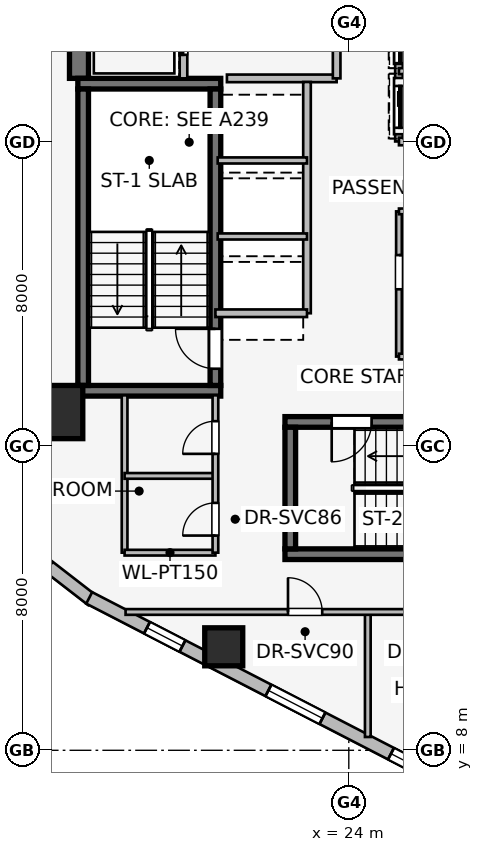
"""IFC4 building model, lengths in metres.
Left out: names, types, materials, properties, quantities, classifications, styles, units other than length and angle.
Written with IfcOpenShell. Run it as: python <this file> out.ifc"""

import sys

from ifc_helpers import new_model, si_unit, direction, frame, frame_2d, origin, origin_2d, place, context, subcontext, project, spatial, rectangle, extrude, element, fill, save


model = new_model("IFC4")
c1 = context("Model", 3, precision=1e-05, world=origin(), true_north=direction((0.0, 1.0)))
c2 = subcontext(c1, "Body", "Model", "MODEL_VIEW")
j1 = project(units=[si_unit("LENGTHUNIT", "METRE"), si_unit("PLANEANGLEUNIT", "RADIAN")], contexts=[c1])
p1 = place(None, origin())
s1 = spatial("IfcSite", under=j1, at=p1, CompositionType="ELEMENT")
p2 = place(p1, origin())
s2 = spatial("IfcBuilding", under=s1, at=p2, CompositionType="ELEMENT")
p3 = place(p2, frame((0.0, 0.0, 139.5)))
s3 = spatial("IfcBuildingStorey", under=s2, at=p3, CompositionType="ELEMENT", Elevation=139.5)
p4 = place(p3, frame((16.9, 25.68, 0.0), z_axis=(0.0, 0.0, 1.0), x_axis=(0.0, 1.0, 0.0)))
e1 = element("IfcWall", 1, at=p4, inside=s3, PredefinedType="SHEAR", context=c2, shape_type="SweptSolid", body=[
    extrude(rectangle(XDim=5.62, YDim=0.5, at=frame_2d((2.81, 0.0))), origin(), (0.0, 0.0, 1.0), 3.45),
])
for number, where, z_axis, x_axis in (
    (2, (16.87, 17.46, 0.0), (0.0, 0.0, 1.0), (1.0, 0.0, 0.0)),
    (3, (20.63, 25.54, 0.0), (0.0, 0.0, 1.0), (-1.0, 0.0, 0.0)),
):
    element("IfcWall", number, at=place(p3, frame(where, z_axis=z_axis, x_axis=x_axis)), inside=s3, PredefinedType="SHEAR", context=c2, shape_type="SweptSolid", body=[
        extrude(rectangle(XDim=3.76, YDim=0.28, at=frame_2d((1.88, 0.0))), origin(), (0.0, 0.0, 1.0), 3.45),
    ])
p5 = place(p3, frame((17.01, 25.4, 0.0), z_axis=(0.0, 0.0, 1.0), x_axis=(0.0, -1.0, 0.0)))
e4 = element("IfcWall", 4, at=p5, inside=s3, PredefinedType="SHEAR", context=c2, shape_type="SweptSolid", body=[
    extrude(rectangle(XDim=7.8, YDim=0.28, at=frame_2d((3.9, 0.0))), origin(), (0.0, 0.0, 1.0), 3.45),
])
p6 = place(p3, frame((20.49, 17.6, 0.0), z_axis=(0.0, 0.0, 1.0), x_axis=(0.0, 1.0, 0.0)))
e5 = element("IfcWall", 5, at=p6, inside=s3, PredefinedType="SHEAR", context=c2, shape_type="SweptSolid", body=[
    extrude(rectangle(XDim=7.8, YDim=0.28, at=frame_2d((3.9, 0.0))), origin(), (0.0, 0.0, 1.0), 3.45),
])
p7 = place(p6, frame((0.44, 0.0, 0.0)))
e6 = element("IfcOpeningElement", 6, at=p7, cuts=e5, PredefinedType="OPENING", context=c2, shape_type="SweptSolid", body=[
    extrude(rectangle(XDim=1.05, YDim=2.0, at=frame_2d((0.525, 1.0))), frame((0.0, 0.15, 0.0), z_axis=(0.0, -1.0, 0.0), x_axis=(1.0, 0.0, 0.0)), (0.0, 0.0, 1.0), 0.3),
])
p8 = place(p3, frame((22.32, 13.16, 0.0), z_axis=(0.0, 0.0, 1.0), x_axis=(1.0, 0.0, 0.0)))
e7 = element("IfcWall", 7, at=p8, inside=s3, PredefinedType="SHEAR", context=c2, shape_type="SweptSolid", body=[
    extrude(rectangle(XDim=8.36, YDim=0.28, at=frame_2d((4.18, 0.0))), origin(), (0.0, 0.0, 1.0), 3.45),
])
p9 = place(p3, frame((30.68, 16.64, 0.0), z_axis=(0.0, 0.0, 1.0), x_axis=(-1.0, 0.0, 0.0)))
e8 = element("IfcWall", 8, at=p9, inside=s3, PredefinedType="SHEAR", context=c2, shape_type="SweptSolid", body=[
    extrude(rectangle(XDim=8.36, YDim=0.28, at=frame_2d((4.18, 0.0))), origin(), (0.0, 0.0, 1.0), 3.45),
])
p10 = place(p9, frame((6.08, 0.0, 0.0)))
e9 = element("IfcOpeningElement", 9, at=p10, cuts=e8, PredefinedType="OPENING", context=c2, shape_type="SweptSolid", body=[
    extrude(rectangle(XDim=1.05, YDim=2.0, at=frame_2d((0.525, 1.0))), frame((0.0, 0.15, 0.0), z_axis=(0.0, -1.0, 0.0), x_axis=(1.0, 0.0, 0.0)), (0.0, 0.0, 1.0), 0.3),
])
p11 = place(p3, frame((22.46, 16.5, 0.0), z_axis=(0.0, 0.0, 1.0), x_axis=(0.0, -1.0, 0.0)))
e10 = element("IfcWall", 10, at=p11, inside=s3, PredefinedType="SHEAR", context=c2, shape_type="SweptSolid", body=[
    extrude(rectangle(XDim=3.2, YDim=0.28, at=frame_2d((1.6, 0.0))), origin(), (0.0, 0.0, 1.0), 3.45),
])
p12 = place(p3, frame((16.3, 16.9, 0.0), z_axis=(0.0, 0.0, 1.0), x_axis=(1.0, 0.0, 0.0)))
e11 = element("IfcColumn", 11, at=p12, inside=s3, PredefinedType="COLUMN", context=c2, shape_type="SweptSolid", body=[
    extrude(rectangle(XDim=1.4, YDim=1.4, at=origin_2d()), origin(), (0.0, 0.0, 1.0), 3.45),
])
p13 = place(p3, frame((20.709, 10.723, 0.0), z_axis=(0.0, 0.0, 1.0), x_axis=(1.0, 0.0, 0.0)))
e12 = element("IfcColumn", 12, at=p13, inside=s3, PredefinedType="COLUMN", context=c2, shape_type="SweptSolid", body=[
    extrude(rectangle(XDim=1.0, YDim=1.0, at=origin_2d()), origin(), (0.0, 0.0, 1.0), 3.45),
])
p14 = place(p3, frame((17.243, 11.95, 0.0), z_axis=(0.0, 0.0, 1.0), x_axis=(-0.790621329885, 0.612305408053, 0.0)))
e13 = element("IfcWall", 13, at=p14, inside=s3, PredefinedType="STANDARD", context=c2, shape_type="SweptSolid", body=[
    extrude(rectangle(XDim=1.676, YDim=0.33, at=frame_2d((0.838, 0.0))), origin(), (0.0, 0.0, 1.0), 3.16),
])
p15 = place(p3, frame((33.769, 3.442, 0.0), z_axis=(0.0, 0.0, 1.0), x_axis=(-0.888613612362, 0.458656568606, 0.0)))
e14 = element("IfcWall", 14, at=p15, inside=s3, PredefinedType="STANDARD", context=c2, shape_type="SweptSolid", body=[
    extrude(rectangle(XDim=18.681, YDim=0.34, at=frame_2d((9.34, 0.0))), origin(), (0.0, 0.0, 1.0), 3.16),
])
p16 = place(p15, frame((1.75, 0.0, 0.75)))
e15 = element("IfcOpeningElement", 15, at=p16, cuts=e14, PredefinedType="OPENING", context=c2, shape_type="SweptSolid", body=[
    extrude(rectangle(XDim=1.05, YDim=1.4, at=frame_2d((0.525, 0.7))), frame((0.0, 0.18, 0.0), z_axis=(0.0, -1.0, 0.0), x_axis=(1.0, 0.0, 0.0)), (0.0, 0.0, 1.0), 0.36),
])
p17 = place(p15, frame((4.765, 0.0, 0.75)))
e16 = element("IfcOpeningElement", 16, at=p17, cuts=e14, PredefinedType="OPENING", context=c2, shape_type="SweptSolid", body=[
    extrude(rectangle(XDim=2.1, YDim=1.5, at=frame_2d((1.05, 0.75))), frame((0.0, 0.18, 0.0), z_axis=(0.0, -1.0, 0.0), x_axis=(1.0, 0.0, 0.0)), (0.0, 0.0, 1.0), 0.36),
])
p18 = place(p15, frame((7.644, 0.0, 0.75)))
e17 = element("IfcOpeningElement", 17, at=p18, cuts=e14, PredefinedType="OPENING", context=c2, shape_type="SweptSolid", body=[
    extrude(rectangle(XDim=2.1, YDim=1.5, at=frame_2d((1.05, 0.75))), frame((0.0, 0.18, 0.0), z_axis=(0.0, -1.0, 0.0), x_axis=(1.0, 0.0, 0.0)), (0.0, 0.0, 1.0), 0.36),
])
p19 = place(p15, frame((11.774, 0.0, 0.75)))
e18 = element("IfcOpeningElement", 18, at=p19, cuts=e14, PredefinedType="OPENING", context=c2, shape_type="SweptSolid", body=[
    extrude(rectangle(XDim=1.6, YDim=1.55, at=frame_2d((0.8, 0.775))), frame((0.0, 0.18, 0.0), z_axis=(0.0, -1.0, 0.0), x_axis=(1.0, 0.0, 0.0)), (0.0, 0.0, 1.0), 0.36),
])
p20 = place(p15, frame((15.92, 0.0, 0.75)))
e19 = element("IfcOpeningElement", 19, at=p20, cuts=e14, PredefinedType="OPENING", context=c2, shape_type="SweptSolid", body=[
    extrude(rectangle(XDim=1.05, YDim=1.4, at=frame_2d((0.525, 0.7))), frame((0.0, 0.18, 0.0), z_axis=(0.0, -1.0, 0.0), x_axis=(1.0, 0.0, 0.0)), (0.0, 0.0, 1.0), 0.36),
])
p21 = place(p3, frame((19.65, 25.68, 0.0), z_axis=(0.0, 0.0, 1.0), x_axis=(0.0, 1.0, 0.0)))
e20 = element("IfcWall", 20, at=p21, inside=s3, PredefinedType="PARTITIONING", context=c2, shape_type="SweptSolid", body=[
    extrude(rectangle(XDim=5.54, YDim=0.2, at=frame_2d((2.77, 0.0))), origin(), (0.0, 0.0, 1.0), 3.16),
])
p22 = place(p21, frame((0.62, 0.0, 0.0)))
e21 = element("IfcOpeningElement", 21, at=p22, cuts=e20, PredefinedType="OPENING", context=c2, shape_type="SweptSolid", body=[
    extrude(rectangle(XDim=1.1, YDim=2.2, at=frame_2d((0.55, 1.1))), frame((0.0, 0.11, 0.0), z_axis=(0.0, -1.0, 0.0), x_axis=(1.0, 0.0, 0.0)), (0.0, 0.0, 1.0), 0.22),
])
p23 = place(p21, frame((3.12, 0.0, 0.0)))
e22 = element("IfcOpeningElement", 22, at=p23, cuts=e20, PredefinedType="OPENING", context=c2, shape_type="SweptSolid", body=[
    extrude(rectangle(XDim=1.1, YDim=2.2, at=frame_2d((0.55, 1.1))), frame((0.0, 0.11, 0.0), z_axis=(0.0, -1.0, 0.0), x_axis=(1.0, 0.0, 0.0)), (0.0, 0.0, 1.0), 0.22),
])
p24 = place(p3, frame((20.793, 25.68, 0.0), z_axis=(0.0, 0.0, 1.0), x_axis=(1.0, 0.0, 0.0)))
e23 = element("IfcWall", 23, at=p24, inside=s3, PredefinedType="PARTITIONING", context=c2, shape_type="SweptSolid", body=[
    extrude(rectangle(XDim=2.887, YDim=0.2, at=frame_2d((1.443, 0.0))), origin(), (0.0, 0.0, 1.0), 3.16),
])
p25 = place(p3, frame((23.68, 25.68, 0.0), z_axis=(0.0, 0.0, 1.0), x_axis=(0.0, 1.0, 0.0)))
e24 = element("IfcWall", 24, at=p25, inside=s3, PredefinedType="PARTITIONING", context=c2, shape_type="SweptSolid", body=[
    extrude(rectangle(XDim=5.54, YDim=0.2, at=frame_2d((2.77, 0.0))), origin(), (0.0, 0.0, 1.0), 3.16),
])
p26 = place(p25, frame((1.8, 0.0, 0.0)))
e25 = element("IfcOpeningElement", 25, at=p26, cuts=e24, PredefinedType="OPENING", context=c2, shape_type="SweptSolid", body=[
    extrude(rectangle(XDim=1.05, YDim=2.0, at=frame_2d((0.525, 1.0))), frame((0.0, 0.11, 0.0), z_axis=(0.0, -1.0, 0.0), x_axis=(1.0, 0.0, 0.0)), (0.0, 0.0, 1.0), 0.22),
])
p27 = place(p3, frame((22.9, 19.5, 0.0), z_axis=(0.0, 0.0, 1.0), x_axis=(0.0, 1.0, 0.0)))
e26 = element("IfcWall", 26, at=p27, inside=s3, PredefinedType="PARTITIONING", context=c2, shape_type="SweptSolid", body=[
    extrude(rectangle(XDim=6.085, YDim=0.2, at=frame_2d((3.042, 0.0))), origin(), (0.0, 0.0, 1.0), 3.16),
])
p28 = place(p3, frame((20.49, 19.5, 0.0), z_axis=(0.0, 0.0, 1.0), x_axis=(1.0, 0.0, 0.0)))
e27 = element("IfcWall", 27, at=p28, inside=s3, PredefinedType="PARTITIONING", context=c2, shape_type="SweptSolid", body=[
    extrude(rectangle(XDim=2.41, YDim=0.2, at=frame_2d((1.205, 0.0))), origin(), (0.0, 0.0, 1.0), 2.06),
])
for number, where, z_axis, x_axis in (
    (28, (20.55, 21.52, 0.0), (0.0, 0.0, 1.0), (1.0, 0.0, 0.0)),
    (29, (20.55, 23.52, 0.0), (0.0, 0.0, 1.0), (1.0, 0.0, 0.0)),
):
    element("IfcWall", number, at=place(p3, frame(where, z_axis=z_axis, x_axis=x_axis)), inside=s3, PredefinedType="PARTITIONING", context=c2, shape_type="SweptSolid", body=[
        extrude(rectangle(XDim=2.35, YDim=0.16, at=frame_2d((1.175, 0.0))), origin(), (0.0, 0.0, 1.0), 3.16),
    ])
p29 = place(p3, frame((25.32, 29.55, 0.0), z_axis=(0.0, 0.0, 1.0), x_axis=(0.0, -1.0, 0.0)))
e30 = element("IfcWall", 30, at=p29, inside=s3, PredefinedType="PARTITIONING", context=c2, shape_type="SweptSolid", body=[
    extrude(rectangle(XDim=5.53, YDim=0.2, at=frame_2d((2.765, 0.0))), origin(), (0.0, 0.0, 1.0), 3.16),
])
p30 = place(p29, frame((0.52, 0.0, 0.0)))
e31 = element("IfcOpeningElement", 31, at=p30, cuts=e30, PredefinedType="OPENING", context=c2, shape_type="SweptSolid", body=[
    extrude(rectangle(XDim=1.1, YDim=2.2, at=frame_2d((0.55, 1.1))), frame((0.0, 0.11, 0.0), z_axis=(0.0, -1.0, 0.0), x_axis=(1.0, 0.0, 0.0)), (0.0, 0.0, 1.0), 0.22),
])
p31 = place(p29, frame((2.37, 0.0, 0.0)))
e32 = element("IfcOpeningElement", 32, at=p31, cuts=e30, PredefinedType="OPENING", context=c2, shape_type="SweptSolid", body=[
    extrude(rectangle(XDim=1.1, YDim=2.2, at=frame_2d((0.55, 1.1))), frame((0.0, 0.11, 0.0), z_axis=(0.0, -1.0, 0.0), x_axis=(1.0, 0.0, 0.0)), (0.0, 0.0, 1.0), 0.22),
])
p32 = place(p29, frame((4.07, 0.0, 0.0)))
e33 = element("IfcOpeningElement", 33, at=p32, cuts=e30, PredefinedType="OPENING", context=c2, shape_type="SweptSolid", body=[
    extrude(rectangle(XDim=1.1, YDim=2.2, at=frame_2d((0.55, 1.1))), frame((0.0, 0.11, 0.0), z_axis=(0.0, -1.0, 0.0), x_axis=(1.0, 0.0, 0.0)), (0.0, 0.0, 1.0), 0.22),
])
p33 = place(p3, frame((25.32, 24.02, 0.0), z_axis=(0.0, 0.0, 1.0), x_axis=(1.0, 0.0, 0.0)))
e34 = element("IfcWall", 34, at=p33, inside=s3, PredefinedType="PARTITIONING", context=c2, shape_type="SweptSolid", body=[
    extrude(rectangle(XDim=2.23, YDim=0.2, at=frame_2d((1.115, 0.0))), origin(), (0.0, 0.0, 1.0), 3.16),
])
p34 = place(p3, frame((25.32, 25.87, 0.0), z_axis=(0.0, 0.0, 1.0), x_axis=(1.0, 0.0, 0.0)))
e35 = element("IfcWall", 35, at=p34, inside=s3, PredefinedType="PARTITIONING", context=c2, shape_type="SweptSolid", body=[
    extrude(rectangle(XDim=2.03, YDim=0.16, at=frame_2d((1.015, 0.0))), origin(), (0.0, 0.0, 1.0), 3.16),
])
p35 = place(p3, frame((25.32, 22.18, 0.0), z_axis=(0.0, 0.0, 1.0), x_axis=(0.0, -1.0, 0.0)))
e36 = element("IfcWall", 36, at=p35, inside=s3, PredefinedType="PARTITIONING", context=c2, shape_type="SweptSolid", body=[
    extrude(rectangle(XDim=3.82, YDim=0.15, at=frame_2d((1.91, 0.0))), origin(), (0.0, 0.0, 1.0), 3.16),
])
p36 = place(p35, frame((1.15, 0.0, 0.0)))
e37 = element("IfcOpeningElement", 37, at=p36, cuts=e36, PredefinedType="OPENING", context=c2, shape_type="SweptSolid", body=[
    extrude(rectangle(XDim=0.9, YDim=2.0, at=frame_2d((0.45, 1.0))), frame((0.0, 0.085, 0.0), z_axis=(0.0, -1.0, 0.0), x_axis=(1.0, 0.0, 0.0)), (0.0, 0.0, 1.0), 0.17),
])
for number, where, z_axis, x_axis in (
    (38, (25.32, 22.18, 0.0), (0.0, 0.0, 1.0), (1.0, 0.0, 0.0)),
    (39, (25.32, 18.36, 0.0), (0.0, 0.0, 1.0), (1.0, 0.0, 0.0)),
):
    element("IfcWall", number, at=place(p3, frame(where, z_axis=z_axis, x_axis=x_axis)), inside=s3, PredefinedType="PARTITIONING", context=c2, shape_type="SweptSolid", body=[
        extrude(rectangle(XDim=2.23, YDim=0.15, at=frame_2d((1.115, 0.0))), origin(), (0.0, 0.0, 1.0), 3.16),
    ])
p37 = place(p3, frame((18.1, 17.34, 0.0), z_axis=(0.0, 0.0, 1.0), x_axis=(0.0, -1.0, 0.0)))
e40 = element("IfcWall", 40, at=p37, inside=s3, PredefinedType="PARTITIONING", context=c2, shape_type="SweptSolid", body=[
    extrude(rectangle(XDim=4.14, YDim=0.15, at=frame_2d((2.07, 0.0))), origin(), (0.0, 0.0, 1.0), 3.16),
])
for number, where, z_axis, x_axis in (
    (41, (18.1, 13.2, 0.0), (0.0, 0.0, 1.0), (1.0, 0.0, 0.0)),
    (42, (18.1, 15.22, 0.0), (0.0, 0.0, 1.0), (1.0, 0.0, 0.0)),
):
    element("IfcWall", number, at=place(p3, frame(where, z_axis=z_axis, x_axis=x_axis)), inside=s3, PredefinedType="PARTITIONING", context=c2, shape_type="SweptSolid", body=[
        extrude(rectangle(XDim=2.39, YDim=0.15, at=frame_2d((1.195, 0.0))), origin(), (0.0, 0.0, 1.0), 3.16),
    ])
p38 = place(p3, frame((20.49, 13.2, 0.0), z_axis=(0.0, 0.0, 1.0), x_axis=(0.0, 1.0, 0.0)))
e43 = element("IfcWall", 43, at=p38, inside=s3, PredefinedType="PARTITIONING", context=c2, shape_type="SweptSolid", body=[
    extrude(rectangle(XDim=4.14, YDim=0.15, at=frame_2d((2.07, 0.0))), origin(), (0.0, 0.0, 1.0), 3.16),
])
p39 = place(p38, frame((0.45, 0.0, 0.0)))
e44 = element("IfcOpeningElement", 44, at=p39, cuts=e43, PredefinedType="OPENING", context=c2, shape_type="SweptSolid", body=[
    extrude(rectangle(XDim=0.86, YDim=2.0, at=frame_2d((0.43, 1.0))), frame((0.0, 0.085, 0.0), z_axis=(0.0, -1.0, 0.0), x_axis=(1.0, 0.0, 0.0)), (0.0, 0.0, 1.0), 0.17),
])
p40 = place(p38, frame((2.6, 0.0, 0.0)))
e45 = element("IfcOpeningElement", 45, at=p40, cuts=e43, PredefinedType="OPENING", context=c2, shape_type="SweptSolid", body=[
    extrude(rectangle(XDim=0.86, YDim=2.0, at=frame_2d((0.43, 1.0))), frame((0.0, 0.085, 0.0), z_axis=(0.0, -1.0, 0.0), x_axis=(1.0, 0.0, 0.0)), (0.0, 0.0, 1.0), 0.17),
])
p41 = place(p3, frame((24.5, 8.35, 0.0), z_axis=(0.0, 0.0, 1.0), x_axis=(0.0, 1.0, 0.0)))
e46 = element("IfcWall", 46, at=p41, inside=s3, PredefinedType="PARTITIONING", context=c2, shape_type="SweptSolid", body=[
    extrude(rectangle(XDim=3.29, YDim=0.15, at=frame_2d((1.645, 0.0))), origin(), (0.0, 0.0, 1.0), 3.16),
])
p42 = place(p3, frame((18.126, 11.64, 0.0), z_axis=(0.0, 0.0, 1.0), x_axis=(1.0, 0.0, 0.0)))
e47 = element("IfcWall", 47, at=p42, inside=s3, PredefinedType="PARTITIONING", context=c2, shape_type="SweptSolid", body=[
    extrude(rectangle(XDim=14.724, YDim=0.15, at=frame_2d((7.362, 0.0))), origin(), (0.0, 0.0, 1.0), 3.16),
])
p43 = place(p42, frame((4.274, 0.0, 0.0)))
e48 = element("IfcOpeningElement", 48, at=p43, cuts=e47, PredefinedType="OPENING", context=c2, shape_type="SweptSolid", body=[
    extrude(rectangle(XDim=0.9, YDim=2.0, at=frame_2d((0.45, 1.0))), frame((0.0, 0.085, 0.0), z_axis=(0.0, -1.0, 0.0), x_axis=(1.0, 0.0, 0.0)), (0.0, 0.0, 1.0), 0.17),
])
p44 = place(p42, frame((7.724, 0.0, 0.0)))
e49 = element("IfcOpeningElement", 49, at=p44, cuts=e47, PredefinedType="OPENING", context=c2, shape_type="SweptSolid", body=[
    extrude(rectangle(XDim=0.9, YDim=2.0, at=frame_2d((0.45, 1.0))), frame((0.0, 0.085, 0.0), z_axis=(0.0, -1.0, 0.0), x_axis=(1.0, 0.0, 0.0)), (0.0, 0.0, 1.0), 0.17),
])
p45 = place(p18, origin())
e50 = element("IfcWindow", 50, at=p45, inside=s3, PartitioningType="SINGLE_PANEL", PredefinedType="WINDOW", context=c2, shape_type="SweptSolid", body=[
    extrude(rectangle(XDim=2.1, YDim=1.5, at=frame_2d((1.05, 0.75))), frame((0.0, 0.03, 0.0), z_axis=(0.0, -1.0, 0.0), x_axis=(1.0, 0.0, 0.0)), (0.0, 0.0, 1.0), 0.06),
])
fill(e17, e50)
p46 = place(p19, origin())
e51 = element("IfcWindow", 51, at=p46, inside=s3, PartitioningType="SINGLE_PANEL", PredefinedType="WINDOW", context=c2, shape_type="SweptSolid", body=[
    extrude(rectangle(XDim=1.6, YDim=1.55, at=frame_2d((0.8, 0.775))), frame((0.0, 0.03, 0.0), z_axis=(0.0, -1.0, 0.0), x_axis=(1.0, 0.0, 0.0)), (0.0, 0.0, 1.0), 0.06),
])
fill(e18, e51)
p47 = place(p20, origin())
e52 = element("IfcWindow", 52, at=p47, inside=s3, PartitioningType="SINGLE_PANEL", PredefinedType="WINDOW", context=c2, shape_type="SweptSolid", body=[
    extrude(rectangle(XDim=1.05, YDim=1.4, at=frame_2d((0.525, 0.7))), frame((0.0, 0.03, 0.0), z_axis=(0.0, -1.0, 0.0), x_axis=(1.0, 0.0, 0.0)), (0.0, 0.0, 1.0), 0.06),
])
fill(e19, e52)
p48 = place(p7, origin())
e53 = element("IfcDoor", 53, at=p48, inside=s3, OperationType="SINGLE_SWING_RIGHT", PredefinedType="DOOR", context=c2, shape_type="SweptSolid", body=[
    extrude(rectangle(XDim=1.05, YDim=2.0, at=frame_2d((0.525, 1.0))), frame((0.0, 0.025, 0.0), z_axis=(0.0, -1.0, 0.0), x_axis=(1.0, 0.0, 0.0)), (0.0, 0.0, 1.0), 0.05),
])
fill(e6, e53)
p49 = place(p10, origin())
e54 = element("IfcDoor", 54, at=p49, inside=s3, OperationType="SINGLE_SWING_RIGHT", PredefinedType="DOOR", context=c2, shape_type="SweptSolid", body=[
    extrude(rectangle(XDim=1.05, YDim=2.0, at=frame_2d((0.525, 1.0))), frame((0.0, 0.025, 0.0), z_axis=(0.0, -1.0, 0.0), x_axis=(1.0, 0.0, 0.0)), (0.0, 0.0, 1.0), 0.05),
])
fill(e9, e54)
p50 = place(p22, origin())
e55 = element("IfcDoor", 55, at=p50, inside=s3, OperationType="SLIDING_TO_LEFT", PredefinedType="DOOR", context=c2, shape_type="SweptSolid", body=[
    extrude(rectangle(XDim=1.1, YDim=2.2, at=frame_2d((0.55, 1.1))), frame((0.0, 0.025, 0.0), z_axis=(0.0, -1.0, 0.0), x_axis=(1.0, 0.0, 0.0)), (0.0, 0.0, 1.0), 0.05),
])
fill(e21, e55)
p51 = place(p31, origin())
e56 = element("IfcDoor", 56, at=p51, inside=s3, OperationType="SLIDING_TO_LEFT", PredefinedType="DOOR", context=c2, shape_type="SweptSolid", body=[
    extrude(rectangle(XDim=1.1, YDim=2.2, at=frame_2d((0.55, 1.1))), frame((0.0, 0.025, 0.0), z_axis=(0.0, -1.0, 0.0), x_axis=(1.0, 0.0, 0.0)), (0.0, 0.0, 1.0), 0.05),
])
fill(e32, e56)
p52 = place(p32, origin())
e57 = element("IfcDoor", 57, at=p52, inside=s3, OperationType="SLIDING_TO_LEFT", PredefinedType="DOOR", context=c2, shape_type="SweptSolid", body=[
    extrude(rectangle(XDim=1.1, YDim=2.2, at=frame_2d((0.55, 1.1))), frame((0.0, 0.025, 0.0), z_axis=(0.0, -1.0, 0.0), x_axis=(1.0, 0.0, 0.0)), (0.0, 0.0, 1.0), 0.05),
])
fill(e33, e57)
p53 = place(p36, origin())
e58 = element("IfcDoor", 58, at=p53, inside=s3, OperationType="SINGLE_SWING_LEFT", PredefinedType="DOOR", context=c2, shape_type="SweptSolid", body=[
    extrude(rectangle(XDim=0.9, YDim=2.0, at=frame_2d((0.45, 1.0))), frame((0.0, 0.025, 0.0), z_axis=(0.0, -1.0, 0.0), x_axis=(1.0, 0.0, 0.0)), (0.0, 0.0, 1.0), 0.05),
])
fill(e37, e58)
p54 = place(p39, origin())
e59 = element("IfcDoor", 59, at=p54, inside=s3, OperationType="SINGLE_SWING_LEFT", PredefinedType="DOOR", context=c2, shape_type="SweptSolid", body=[
    extrude(rectangle(XDim=0.86, YDim=2.0, at=frame_2d((0.43, 1.0))), frame((0.0, 0.025, 0.0), z_axis=(0.0, -1.0, 0.0), x_axis=(1.0, 0.0, 0.0)), (0.0, 0.0, 1.0), 0.05),
])
fill(e44, e59)
p55 = place(p40, origin())
e60 = element("IfcDoor", 60, at=p55, inside=s3, OperationType="SINGLE_SWING_LEFT", PredefinedType="DOOR", context=c2, shape_type="SweptSolid", body=[
    extrude(rectangle(XDim=0.86, YDim=2.0, at=frame_2d((0.43, 1.0))), frame((0.0, 0.025, 0.0), z_axis=(0.0, -1.0, 0.0), x_axis=(1.0, 0.0, 0.0)), (0.0, 0.0, 1.0), 0.05),
])
fill(e45, e60)
p56 = place(p43, origin())
e61 = element("IfcDoor", 61, at=p56, inside=s3, OperationType="SINGLE_SWING_LEFT", PredefinedType="DOOR", context=c2, shape_type="SweptSolid", body=[
    extrude(rectangle(XDim=0.9, YDim=2.0, at=frame_2d((0.45, 1.0))), frame((0.0, 0.025, 0.0), z_axis=(0.0, -1.0, 0.0), x_axis=(1.0, 0.0, 0.0)), (0.0, 0.0, 1.0), 0.05),
])
fill(e48, e61)
save(model, sys.argv[1])
